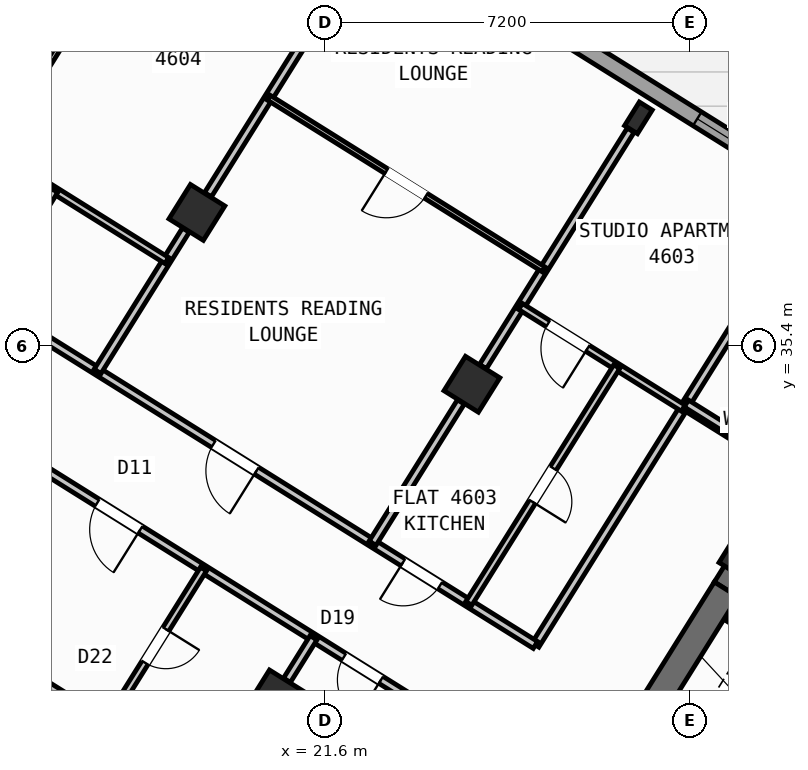
"""IFC4 building model, lengths in metres.
Left out: names, types, materials, properties, quantities, classifications, styles, units other than length and angle.
Written with IfcOpenShell. Run it as: python <this file> out.ifc"""

import sys

from ifc_helpers import new_model, si_unit, direction, frame, frame_2d, origin, origin_2d, place, context, subcontext, project, spatial, rectangle, hollow_rectangle, i_section, extrude, source, transform, mapped, element, fill, save


model = new_model("IFC4")
c1 = context("Model", 3, precision=1e-05, world=origin(), true_north=direction((0.0, 1.0)))
c2 = subcontext(c1, "Body", "Model", "MODEL_VIEW")
j1 = project(units=[si_unit("LENGTHUNIT", "METRE"), si_unit("PLANEANGLEUNIT", "RADIAN")], contexts=[c1])
p1 = place(None, origin())
s1 = spatial("IfcSite", under=j1, at=p1, CompositionType="ELEMENT")
p2 = place(p1, origin())
s2 = spatial("IfcBuilding", under=s1, at=p2, CompositionType="ELEMENT")
p3 = place(p2, frame((0.0, 0.0, 184.2)))
s3 = spatial("IfcBuildingStorey", under=s2, at=p3, CompositionType="ELEMENT", Elevation=184.2)
p4 = place(p3, frame((40.573, 24.01, 0.0), z_axis=(0.0, 0.0, 1.0), x_axis=(-0.848047359947, 0.529920442413, 0.0)))
e1 = element("IfcWall", 1, at=p4, inside=s3, PredefinedType="SHEAR", context=c2, shape_type="SweptSolid", body=[
    extrude(rectangle(XDim=13.14, YDim=0.55, at=frame_2d((6.57, 0.0))), origin(), (0.0, 0.0, 1.0), 3.35),
])
p5 = place(p3, frame((29.517, 30.594, 0.0), z_axis=(0.0, 0.0, 1.0), x_axis=(-0.529906864564, -0.848055844204, 0.0)))
e2 = element("IfcWall", 2, at=p5, inside=s3, PredefinedType="SHEAR", context=c2, shape_type="SweptSolid", body=[
    extrude(rectangle(XDim=3.575, YDim=0.55, at=frame_2d((1.788, 0.0))), origin(), (0.0, 0.0, 1.0), 3.35),
])
m1 = source(origin(), c2, "Body", "SweptSolid", [
    extrude(hollow_rectangle(XDim=0.8, YDim=0.8, WallThickness=0.032, at=origin_2d()), origin(), (0.0, 0.0, 1.0), 3.6),
])
p6 = place(p3, frame((29.928, 31.251, 0.0), z_axis=(0.0, 0.0, 1.0), x_axis=(-0.848048096156, 0.529919264233, 0.0)))
e3 = element("IfcColumn", 3, at=p6, inside=s3, PredefinedType="COLUMN", context=c2, shape_type="MappedRepresentation", body=[
    mapped(m1, transform((0.0, 0.0, 0.0), scale=1.0)),
])
m2 = source(origin(), c2, "Body", "SweptSolid", [
    extrude(i_section(OverallWidth=0.3, OverallDepth=0.55, WebThickness=0.015, FlangeThickness=0.029, at=origin_2d()), origin(), (0.0, 0.0, 1.0), 3.6),
])
p7 = place(p3, frame((27.786, 39.901, 0.0), z_axis=(0.0, 0.0, 1.0), x_axis=(-0.848048096156, 0.529919264233, 0.0)))
e4 = element("IfcColumn", 4, at=p7, inside=s3, PredefinedType="COLUMN", context=c2, shape_type="MappedRepresentation", body=[
    mapped(m2, transform((0.0, 0.0, 0.0), scale=1.0)),
])
for number, where, z_axis, x_axis in (
    (5, (24.5, 34.643, 0.0), (0.0, 0.0, 1.0), (-0.848, 0.53, 0.0)),
    (6, (20.632, 28.452, 0.0), (0.0, 0.0, 1.0), (-0.848, 0.53, 0.0)),
    (7, (19.073, 38.034, 0.0), (0.0, 0.0, 1.0), (-0.848, 0.53, 0.0)),
):
    element("IfcColumn", number, at=place(p3, frame(where, z_axis=z_axis, x_axis=x_axis)), inside=s3, PredefinedType="COLUMN", context=c2, shape_type="MappedRepresentation", body=[
        mapped(m1, transform((0.0, 0.0, 0.0), scale=1.0)),
    ])
p8 = place(p3, frame((5.7, 28.71, 0.0), z_axis=(0.0, 0.0, 1.0), x_axis=(0.529923711467, 0.8480453172, 0.0)))
e8 = element("IfcWall", 8, at=p8, inside=s3, PredefinedType="STANDARD", context=c2, shape_type="SweptSolid", body=[
    extrude(rectangle(XDim=21.587, YDim=0.32, at=frame_2d((10.794, 0.0))), origin(), (0.0, 0.0, 1.0), 2.825),
])
p9 = place(p8, frame((1.44, 0.0, 0.95)))
e9 = element("IfcOpeningElement", 9, at=p9, cuts=e8, PredefinedType="OPENING", context=c2, shape_type="SweptSolid", body=[
    extrude(rectangle(XDim=1.2, YDim=1.4, at=frame_2d((0.6, 0.7))), frame((0.0, 0.17, 0.0), z_axis=(0.0, -1.0, 0.0), x_axis=(1.0, 0.0, 0.0)), (0.0, 0.0, 1.0), 0.34),
])
p10 = place(p8, frame((4.545, 0.0, 0.85)))
e10 = element("IfcOpeningElement", 10, at=p10, cuts=e8, PredefinedType="OPENING", context=c2, shape_type="SweptSolid", body=[
    extrude(rectangle(XDim=1.8, YDim=1.5, at=frame_2d((0.9, 0.75))), frame((0.0, 0.17, 0.0), z_axis=(0.0, -1.0, 0.0), x_axis=(1.0, 0.0, 0.0)), (0.0, 0.0, 1.0), 0.34),
])
p11 = place(p8, frame((12.139, 0.0, 1.0)))
e11 = element("IfcOpeningElement", 11, at=p11, cuts=e8, PredefinedType="OPENING", context=c2, shape_type="SweptSolid", body=[
    extrude(rectangle(XDim=0.9, YDim=1.25, at=frame_2d((0.45, 0.625))), frame((0.0, 0.17, 0.0), z_axis=(0.0, -1.0, 0.0), x_axis=(1.0, 0.0, 0.0)), (0.0, 0.0, 1.0), 0.34),
])
p12 = place(p8, frame((16.35, 0.0, 0.95)))
e12 = element("IfcOpeningElement", 12, at=p12, cuts=e8, PredefinedType="OPENING", context=c2, shape_type="SweptSolid", body=[
    extrude(rectangle(XDim=1.2, YDim=1.4, at=frame_2d((0.6, 0.7))), frame((0.0, 0.17, 0.0), z_axis=(0.0, -1.0, 0.0), x_axis=(1.0, 0.0, 0.0)), (0.0, 0.0, 1.0), 0.34),
])
p13 = place(p8, frame((18.762, 0.0, 0.95)))
e13 = element("IfcOpeningElement", 13, at=p13, cuts=e8, PredefinedType="OPENING", context=c2, shape_type="SweptSolid", body=[
    extrude(rectangle(XDim=1.2, YDim=1.4, at=frame_2d((0.6, 0.7))), frame((0.0, 0.17, 0.0), z_axis=(0.0, -1.0, 0.0), x_axis=(1.0, 0.0, 0.0)), (0.0, 0.0, 1.0), 0.34),
])
p14 = place(p3, frame((17.424, 47.083, 0.0), z_axis=(0.0, 0.0, 1.0), x_axis=(0.848049927979, -0.529916332693, 0.0)))
e14 = element("IfcWall", 14, at=p14, inside=s3, PredefinedType="STANDARD", context=c2, shape_type="SweptSolid", body=[
    extrude(rectangle(XDim=29.223, YDim=0.32, at=frame_2d((14.612, 0.0))), origin(), (0.0, 0.0, 1.0), 3.35),
])
p15 = place(p14, frame((3.764, 0.0, 0.0)))
e15 = element("IfcOpeningElement", 15, at=p15, cuts=e14, PredefinedType="OPENING", context=c2, shape_type="SweptSolid", body=[
    extrude(rectangle(XDim=1.05, YDim=2.15, at=frame_2d((0.525, 1.075))), frame((0.0, 0.17, 0.0), z_axis=(0.0, -1.0, 0.0), x_axis=(1.0, 0.0, 0.0)), (0.0, 0.0, 1.0), 0.34),
])
p16 = place(p14, frame((8.344, 0.0, 0.8)))
e16 = element("IfcOpeningElement", 16, at=p16, cuts=e14, PredefinedType="OPENING", context=c2, shape_type="SweptSolid", body=[
    extrude(rectangle(XDim=2.1, YDim=1.55, at=frame_2d((1.05, 0.775))), frame((0.0, 0.17, 0.0), z_axis=(0.0, -1.0, 0.0), x_axis=(1.0, 0.0, 0.0)), (0.0, 0.0, 1.0), 0.34),
])
p17 = place(p14, frame((13.589, 0.0, 0.85)))
e17 = element("IfcOpeningElement", 17, at=p17, cuts=e14, PredefinedType="OPENING", context=c2, shape_type="SweptSolid", body=[
    extrude(rectangle(XDim=1.8, YDim=1.5, at=frame_2d((0.9, 0.75))), frame((0.0, 0.17, 0.0), z_axis=(0.0, -1.0, 0.0), x_axis=(1.0, 0.0, 0.0)), (0.0, 0.0, 1.0), 0.34),
])
p18 = place(p14, frame((17.104, 0.0, 0.95)))
e18 = element("IfcOpeningElement", 18, at=p18, cuts=e14, PredefinedType="OPENING", context=c2, shape_type="SweptSolid", body=[
    extrude(rectangle(XDim=1.2, YDim=1.4, at=frame_2d((0.6, 0.7))), frame((0.0, 0.17, 0.0), z_axis=(0.0, -1.0, 0.0), x_axis=(1.0, 0.0, 0.0)), (0.0, 0.0, 1.0), 0.34),
])
p19 = place(p14, frame((21.214, 0.0, 0.95)))
e19 = element("IfcOpeningElement", 19, at=p19, cuts=e14, PredefinedType="OPENING", context=c2, shape_type="SweptSolid", body=[
    extrude(rectangle(XDim=1.2, YDim=1.4, at=frame_2d((0.6, 0.7))), frame((0.0, 0.17, 0.0), z_axis=(0.0, -1.0, 0.0), x_axis=(1.0, 0.0, 0.0)), (0.0, 0.0, 1.0), 0.34),
])
p20 = place(p14, frame((25.853, 0.0, 0.95)))
e20 = element("IfcOpeningElement", 20, at=p20, cuts=e14, PredefinedType="OPENING", context=c2, shape_type="SweptSolid", body=[
    extrude(rectangle(XDim=1.2, YDim=1.4, at=frame_2d((0.6, 0.7))), frame((0.0, 0.17, 0.0), z_axis=(0.0, -1.0, 0.0), x_axis=(1.0, 0.0, 0.0)), (0.0, 0.0, 1.0), 0.34),
])
p21 = place(p3, frame((33.363, 27.69, 0.0), z_axis=(0.0, 0.0, 1.0), x_axis=(-0.848047090064, 0.529920874315, 0.0)))
e21 = element("IfcWall", 21, at=p21, inside=s3, PredefinedType="STANDARD", context=c2, shape_type="SweptSolid", body=[
    extrude(rectangle(XDim=4.498, YDim=0.2, at=frame_2d((2.249, 0.0))), origin(), (0.0, 0.0, 1.0), 3.34),
])
p22 = place(p3, frame((30.914, 32.829, 0.0), z_axis=(0.0, 0.0, 1.0), x_axis=(-0.848008813643, 0.529982124211, 0.0)))
e22 = element("IfcWall", 22, at=p22, inside=s3, PredefinedType="PARTITIONING", context=c2, shape_type="SweptSolid", body=[
    extrude(rectangle(XDim=2.61, YDim=0.16, at=frame_2d((1.305, 0.0))), origin(), (0.0, 0.0, 1.0), 3.34),
])
p23 = place(p3, frame((31.239, 38.274, 0.0), z_axis=(0.0, 0.0, 1.0), x_axis=(-0.529914125013, -0.848051307476, 0.0)))
e23 = element("IfcWall", 23, at=p23, inside=s3, PredefinedType="PARTITIONING", context=c2, shape_type="SweptSolid", body=[
    extrude(rectangle(XDim=10.35, YDim=0.16, at=frame_2d((5.175, 0.0))), origin(), (0.0, 0.0, 1.0), 3.34),
])
p24 = place(p3, frame((25.754, 29.497, 0.0), z_axis=(0.0, 0.0, 1.0), x_axis=(-0.848045850158, 0.529922858565, 0.0)))
e24 = element("IfcWall", 24, at=p24, inside=s3, PredefinedType="PARTITIONING", context=c2, shape_type="SweptSolid", body=[
    extrude(rectangle(XDim=16.73, YDim=0.16, at=frame_2d((8.365, 0.0))), origin(), (0.0, 0.0, 1.0), 3.34),
])
p25 = place(p24, frame((2.22, 0.0, 0.0)))
e25 = element("IfcOpeningElement", 25, at=p25, cuts=e24, PredefinedType="OPENING", context=c2, shape_type="SweptSolid", body=[
    extrude(rectangle(XDim=0.86, YDim=2.05, at=frame_2d((0.43, 1.025))), frame((0.0, 0.09, 0.0), z_axis=(0.0, -1.0, 0.0), x_axis=(1.0, 0.0, 0.0)), (0.0, 0.0, 1.0), 0.18),
])
p26 = place(p24, frame((6.49, 0.0, 0.0)))
e26 = element("IfcOpeningElement", 26, at=p26, cuts=e24, PredefinedType="OPENING", context=c2, shape_type="SweptSolid", body=[
    extrude(rectangle(XDim=1.0, YDim=2.1, at=frame_2d((0.5, 1.05))), frame((0.0, 0.09, 0.0), z_axis=(0.0, -1.0, 0.0), x_axis=(1.0, 0.0, 0.0)), (0.0, 0.0, 1.0), 0.18),
])
p27 = place(p24, frame((14.304, 0.0, 0.0)))
e27 = element("IfcOpeningElement", 27, at=p27, cuts=e24, PredefinedType="OPENING", context=c2, shape_type="SweptSolid", body=[
    extrude(rectangle(XDim=1.0, YDim=2.1, at=frame_2d((0.5, 1.05))), frame((0.0, 0.09, 0.0), z_axis=(0.0, -1.0, 0.0), x_axis=(1.0, 0.0, 0.0)), (0.0, 0.0, 1.0), 0.18),
])
p28 = place(p3, frame((24.588, 27.631, 0.0), z_axis=(0.0, 0.0, 1.0), x_axis=(-0.848041752158, 0.529929416617, 0.0)))
e28 = element("IfcWall", 28, at=p28, inside=s3, PredefinedType="PARTITIONING", context=c2, shape_type="SweptSolid", body=[
    extrude(rectangle(XDim=16.73, YDim=0.16, at=frame_2d((8.365, 0.0))), origin(), (0.0, 0.0, 1.0), 3.34),
])
p29 = place(p28, frame((2.22, 0.0, 0.0)))
e29 = element("IfcOpeningElement", 29, at=p29, cuts=e28, PredefinedType="OPENING", context=c2, shape_type="SweptSolid", body=[
    extrude(rectangle(XDim=0.86, YDim=2.05, at=frame_2d((0.43, 1.025))), frame((0.0, 0.09, 0.0), z_axis=(0.0, -1.0, 0.0), x_axis=(1.0, 0.0, 0.0)), (0.0, 0.0, 1.0), 0.18),
])
p30 = place(p28, frame((7.82, 0.0, 0.0)))
e30 = element("IfcOpeningElement", 30, at=p30, cuts=e28, PredefinedType="OPENING", context=c2, shape_type="SweptSolid", body=[
    extrude(rectangle(XDim=1.0, YDim=2.1, at=frame_2d((0.5, 1.05))), frame((0.0, 0.09, 0.0), z_axis=(0.0, -1.0, 0.0), x_axis=(1.0, 0.0, 0.0)), (0.0, 0.0, 1.0), 0.18),
])
p31 = place(p28, frame((12.95, 0.0, 0.0)))
e31 = element("IfcOpeningElement", 31, at=p31, cuts=e28, PredefinedType="OPENING", context=c2, shape_type="SweptSolid", body=[
    extrude(rectangle(XDim=1.0, YDim=2.1, at=frame_2d((0.5, 1.05))), frame((0.0, 0.09, 0.0), z_axis=(0.0, -1.0, 0.0), x_axis=(1.0, 0.0, 0.0)), (0.0, 0.0, 1.0), 0.18),
])
p32 = place(p3, frame((21.374, 29.639, 0.0), z_axis=(0.0, 0.0, 1.0), x_axis=(-0.529998940003, -0.847998304005, 0.0)))
e32 = element("IfcWall", 32, at=p32, inside=s3, PredefinedType="PARTITIONING", context=c2, shape_type="SweptSolid", body=[
    extrude(rectangle(XDim=0.988, YDim=0.16, at=frame_2d((0.494, 0.0))), origin(), (0.0, 0.0, 1.0), 2.825),
])
p33 = place(p3, frame((19.477, 26.603, 0.0), z_axis=(0.0, 0.0, 1.0), x_axis=(-0.848039019877, 0.529933789039, 0.0)))
e33 = element("IfcWall", 33, at=p33, inside=s3, PredefinedType="PLUMBINGWALL", context=c2, shape_type="SweptSolid", body=[
    extrude(rectangle(XDim=6.4, YDim=0.14, at=frame_2d((3.2, 0.0))), origin(), (0.0, 0.0, 1.0), 3.34),
])
p34 = place(p33, frame((2.824, 0.0, 0.0)))
e34 = element("IfcOpeningElement", 34, at=p34, cuts=e33, PredefinedType="OPENING", context=c2, shape_type="SweptSolid", body=[
    extrude(rectangle(XDim=0.78, YDim=2.05, at=frame_2d((0.39, 1.025))), frame((0.0, 0.08, 0.0), z_axis=(0.0, -1.0, 0.0), x_axis=(1.0, 0.0, 0.0)), (0.0, 0.0, 1.0), 0.16),
])
p35 = place(p3, frame((19.203, 30.996, 0.0), z_axis=(0.0, 0.0, 1.0), x_axis=(-0.529906983049, -0.848055770169, 0.0)))
e35 = element("IfcWall", 35, at=p35, inside=s3, PredefinedType="PLUMBINGWALL", context=c2, shape_type="SweptSolid", body=[
    extrude(rectangle(XDim=3.58, YDim=0.14, at=frame_2d((1.79, 0.0))), origin(), (0.0, 0.0, 1.0), 3.34),
])
p36 = place(p35, frame((1.4, 0.0, 0.0)))
e36 = element("IfcOpeningElement", 36, at=p36, cuts=e35, PredefinedType="OPENING", context=c2, shape_type="SweptSolid", body=[
    extrude(rectangle(XDim=0.78, YDim=2.05, at=frame_2d((0.39, 1.025))), frame((0.0, 0.08, 0.0), z_axis=(0.0, -1.0, 0.0), x_axis=(1.0, 0.0, 0.0)), (0.0, 0.0, 1.0), 0.16),
])
p37 = place(p3, frame((27.634, 39.657, 0.0), z_axis=(0.0, 0.0, 1.0), x_axis=(-0.529899205623, -0.848060629837, 0.0)))
e37 = element("IfcWall", 37, at=p37, inside=s3, PredefinedType="PARTITIONING", context=c2, shape_type="SweptSolid", body=[
    extrude(rectangle(XDim=5.501, YDim=0.16, at=frame_2d((2.75, 0.0))), origin(), (0.0, 0.0, 1.0), 2.825),
])
p38 = place(p3, frame((24.282, 34.293, 0.0), z_axis=(0.0, 0.0, 1.0), x_axis=(-0.529938869374, -0.84803584519, 0.0)))
e38 = element("IfcWall", 38, at=p38, inside=s3, PredefinedType="PARTITIONING", context=c2, shape_type="SweptSolid", body=[
    extrude(rectangle(XDim=3.288, YDim=0.16, at=frame_2d((1.644, 0.0))), origin(), (0.0, 0.0, 1.0), 2.825),
])
p39 = place(p3, frame((28.674, 34.169, 0.0), z_axis=(0.0, 0.0, 1.0), x_axis=(-0.848059820872, 0.529900500304, 0.0)))
e39 = element("IfcWall", 39, at=p39, inside=s3, PredefinedType="PLUMBINGWALL", context=c2, shape_type="SweptSolid", body=[
    extrude(rectangle(XDim=3.79, YDim=0.14, at=frame_2d((1.895, 0.0))), origin(), (0.0, 0.0, 1.0), 3.34),
])
p40 = place(p39, frame((2.23, 0.0, 0.0)))
e40 = element("IfcOpeningElement", 40, at=p40, cuts=e39, PredefinedType="OPENING", context=c2, shape_type="SweptSolid", body=[
    extrude(rectangle(XDim=0.92, YDim=2.08, at=frame_2d((0.46, 1.04))), frame((0.0, 0.08, 0.0), z_axis=(0.0, -1.0, 0.0), x_axis=(1.0, 0.0, 0.0)), (0.0, 0.0, 1.0), 0.16),
])
p41 = place(p3, frame((27.359, 34.991, 0.0), z_axis=(0.0, 0.0, 1.0), x_axis=(-0.529907329021, -0.848055553988, 0.0)))
e41 = element("IfcWall", 41, at=p41, inside=s3, PredefinedType="PLUMBINGWALL", context=c2, shape_type="SweptSolid", body=[
    extrude(rectangle(XDim=5.51, YDim=0.14, at=frame_2d((2.755, 0.0))), origin(), (0.0, 0.0, 1.0), 2.995),
])
p42 = place(p41, frame((2.365, 0.0, 0.0)))
e42 = element("IfcOpeningElement", 42, at=p42, cuts=e41, PredefinedType="OPENING", context=c2, shape_type="SweptSolid", body=[
    extrude(rectangle(XDim=0.78, YDim=2.05, at=frame_2d((0.39, 1.025))), frame((0.0, 0.08, 0.0), z_axis=(0.0, -1.0, 0.0), x_axis=(1.0, 0.0, 0.0)), (0.0, 0.0, 1.0), 0.16),
])
p43 = place(p3, frame((22.206, 43.049, 0.0), z_axis=(0.0, 0.0, 1.0), x_axis=(-0.529919150083, -0.848048167486, 0.0)))
e43 = element("IfcWall", 43, at=p43, inside=s3, PredefinedType="PARTITIONING", context=c2, shape_type="SweptSolid", body=[
    extrude(rectangle(XDim=5.501, YDim=0.16, at=frame_2d((2.75, 0.0))), origin(), (0.0, 0.0, 1.0), 2.825),
])
p44 = place(p3, frame((18.854, 37.685, 0.0), z_axis=(0.0, 0.0, 1.0), x_axis=(-0.529885466561, -0.848069214349, 0.0)))
e44 = element("IfcWall", 44, at=p44, inside=s3, PredefinedType="PARTITIONING", context=c2, shape_type="SweptSolid", body=[
    extrude(rectangle(XDim=3.288, YDim=0.16, at=frame_2d((1.644, 0.0))), origin(), (0.0, 0.0, 1.0), 2.825),
])
p45 = place(p3, frame((25.916, 36.909, 0.0), z_axis=(0.0, 0.0, 1.0), x_axis=(-0.848056163074, 0.529906354247, 0.0)))
e45 = element("IfcWall", 45, at=p45, inside=s3, PredefinedType="PARTITIONING", context=c2, shape_type="SweptSolid", body=[
    extrude(rectangle(XDim=6.4, YDim=0.11, at=frame_2d((3.2, 0.0))), origin(), (0.0, 0.0, 1.0), 3.34),
])
p46 = place(p45, frame((2.74, 0.0, 0.0)))
e46 = element("IfcOpeningElement", 46, at=p46, cuts=e45, PredefinedType="OPENING", context=c2, shape_type="SweptSolid", body=[
    extrude(rectangle(XDim=0.92, YDim=2.08, at=frame_2d((0.46, 1.04))), frame((0.0, 0.065, 0.0), z_axis=(0.0, -1.0, 0.0), x_axis=(1.0, 0.0, 0.0)), (0.0, 0.0, 1.0), 0.13),
])
p47 = place(p3, frame((18.479, 37.084, 0.0), z_axis=(0.0, 0.0, 1.0), x_axis=(-0.848048787466, 0.529918157905, 0.0)))
e47 = element("IfcWall", 47, at=p47, inside=s3, PredefinedType="PLUMBINGWALL", context=c2, shape_type="SweptSolid", body=[
    extrude(rectangle(XDim=6.52, YDim=0.14, at=frame_2d((3.26, 0.0))), origin(), (0.0, 0.0, 1.0), 3.34),
])
p48 = place(p47, frame((2.885, 0.0, 0.0)))
e48 = element("IfcOpeningElement", 48, at=p48, cuts=e47, PredefinedType="OPENING", context=c2, shape_type="SweptSolid", body=[
    extrude(rectangle(XDim=0.78, YDim=2.05, at=frame_2d((0.39, 1.025))), frame((0.0, 0.08, 0.0), z_axis=(0.0, -1.0, 0.0), x_axis=(1.0, 0.0, 0.0)), (0.0, 0.0, 1.0), 0.16),
])
p49 = place(p3, frame((16.268, 38.467, 0.0), z_axis=(0.0, 0.0, 1.0), x_axis=(-0.529913878929, -0.848051461244, 0.0)))
e49 = element("IfcWall", 49, at=p49, inside=s3, PredefinedType="PLUMBINGWALL", context=c2, shape_type="SweptSolid", body=[
    extrude(rectangle(XDim=2.58, YDim=0.14, at=frame_2d((1.29, 0.0))), origin(), (0.0, 0.0, 1.0), 3.34),
])
p50 = place(p49, frame((0.9, 0.0, 0.0)))
e50 = element("IfcOpeningElement", 50, at=p50, cuts=e49, PredefinedType="OPENING", context=c2, shape_type="SweptSolid", body=[
    extrude(rectangle(XDim=0.78, YDim=2.05, at=frame_2d((0.39, 1.025))), frame((0.0, 0.08, 0.0), z_axis=(0.0, -1.0, 0.0), x_axis=(1.0, 0.0, 0.0)), (0.0, 0.0, 1.0), 0.16),
])
p51 = place(p3, frame((19.312, 46.045, 0.0), z_axis=(0.0, 0.0, 1.0), x_axis=(-0.529933431478, -0.848039243315, 0.0)))
e51 = element("IfcWall", 51, at=p51, inside=s3, PredefinedType="PARTITIONING", context=c2, shape_type="SweptSolid", body=[
    extrude(rectangle(XDim=8.04, YDim=0.11, at=frame_2d((4.02, 0.0))), origin(), (0.0, 0.0, 1.0), 2.995),
])
p52 = place(p51, frame((0.47, 0.0, 0.0)))
e52 = element("IfcOpeningElement", 52, at=p52, cuts=e51, PredefinedType="OPENING", context=c2, shape_type="SweptSolid", body=[
    extrude(rectangle(XDim=0.92, YDim=2.08, at=frame_2d((0.46, 1.04))), frame((0.0, 0.065, 0.0), z_axis=(0.0, -1.0, 0.0), x_axis=(1.0, 0.0, 0.0)), (0.0, 0.0, 1.0), 0.13),
])
p53 = place(p3, frame((41.936, 26.012, 0.0), z_axis=(0.0, 0.0, 1.0), x_axis=(-0.848051154596, 0.529914369676, 0.0)))
e53 = element("IfcWall", 53, at=p53, inside=s3, PredefinedType="PARTITIONING", context=c2, shape_type="SweptSolid", body=[
    extrude(rectangle(XDim=15.57, YDim=0.16, at=frame_2d((7.785, 0.0))), origin(), (0.0, 0.0, 1.0), 3.34),
])
p54 = place(p53, frame((10.83, 0.0, 0.0)))
e54 = element("IfcOpeningElement", 54, at=p54, cuts=e53, PredefinedType="OPENING", context=c2, shape_type="SweptSolid", body=[
    extrude(rectangle(XDim=1.0, YDim=2.1, at=frame_2d((0.5, 1.05))), frame((0.0, 0.09, 0.0), z_axis=(0.0, -1.0, 0.0), x_axis=(1.0, 0.0, 0.0)), (0.0, 0.0, 1.0), 0.18),
])
m3 = source(origin(), c2, "Body", "SweptSolid", [
    extrude(rectangle(XDim=1.8, YDim=1.5, at=frame_2d((0.9, 0.75))), frame((0.0, 0.03, 0.0), z_axis=(0.0, -1.0, 0.0), x_axis=(1.0, 0.0, 0.0)), (0.0, 0.0, 1.0), 0.06),
])
p55 = place(p17, origin())
e55 = element("IfcWindow", 55, at=p55, inside=s3, PartitioningType="SINGLE_PANEL", PredefinedType="WINDOW", context=c2, shape_type="MappedRepresentation", body=[
    mapped(m3, transform((0.0, 0.0, 0.0), scale=1.0)),
])
fill(e17, e55)
m4 = source(origin(), c2, "Body", "SweptSolid", [
    extrude(rectangle(XDim=0.86, YDim=2.05, at=frame_2d((0.43, 1.025))), frame((0.0, 0.025, 0.0), z_axis=(0.0, -1.0, 0.0), x_axis=(1.0, 0.0, 0.0)), (0.0, 0.0, 1.0), 0.05),
])
p56 = place(p29, origin())
e56 = element("IfcDoor", 56, at=p56, inside=s3, OperationType="SINGLE_SWING_LEFT", PredefinedType="DOOR", context=c2, shape_type="MappedRepresentation", body=[
    mapped(m4, transform((0.0, 0.0, 0.0), scale=1.0)),
])
fill(e29, e56)
m5 = source(origin(), c2, "Body", "SweptSolid", [
    extrude(rectangle(XDim=1.0, YDim=2.1, at=frame_2d((0.5, 1.05))), frame((0.0, 0.025, 0.0), z_axis=(0.0, -1.0, 0.0), x_axis=(1.0, 0.0, 0.0)), (0.0, 0.0, 1.0), 0.05),
])
p57 = place(p30, origin())
e57 = element("IfcDoor", 57, at=p57, inside=s3, OperationType="SINGLE_SWING_LEFT", PredefinedType="DOOR", context=c2, shape_type="MappedRepresentation", body=[
    mapped(m5, transform((0.0, 0.0, 0.0), scale=1.0)),
])
fill(e30, e57)
m6 = source(origin(), c2, "Body", "SweptSolid", [
    extrude(rectangle(XDim=0.78, YDim=2.05, at=frame_2d((0.39, 1.025))), frame((0.0, 0.025, 0.0), z_axis=(0.0, -1.0, 0.0), x_axis=(1.0, 0.0, 0.0)), (0.0, 0.0, 1.0), 0.05),
])
p58 = place(p36, origin())
e58 = element("IfcDoor", 58, at=p58, inside=s3, OperationType="SINGLE_SWING_LEFT", PredefinedType="DOOR", context=c2, shape_type="MappedRepresentation", body=[
    mapped(m6, transform((0.0, 0.0, 0.0), scale=1.0)),
])
fill(e36, e58)
p59 = place(p25, origin())
e59 = element("IfcDoor", 59, at=p59, inside=s3, OperationType="SINGLE_SWING_RIGHT", PredefinedType="DOOR", context=c2, shape_type="MappedRepresentation", body=[
    mapped(m4, transform((0.0, 0.0, 0.0), scale=1.0)),
])
fill(e25, e59)
m7 = source(origin(), c2, "Body", "SweptSolid", [
    extrude(rectangle(XDim=0.92, YDim=2.08, at=frame_2d((0.46, 1.04))), frame((0.0, 0.025, 0.0), z_axis=(0.0, -1.0, 0.0), x_axis=(1.0, 0.0, 0.0)), (0.0, 0.0, 1.0), 0.05),
])
p60 = place(p40, origin())
e60 = element("IfcDoor", 60, at=p60, inside=s3, OperationType="SINGLE_SWING_LEFT", PredefinedType="DOOR", context=c2, shape_type="MappedRepresentation", body=[
    mapped(m7, transform((0.0, 0.0, 0.0), scale=1.0)),
])
fill(e40, e60)
p61 = place(p42, origin())
e61 = element("IfcDoor", 61, at=p61, inside=s3, OperationType="SINGLE_SWING_RIGHT", PredefinedType="DOOR", context=c2, shape_type="MappedRepresentation", body=[
    mapped(m6, transform((0.0, 0.0, 0.0), scale=1.0)),
])
fill(e42, e61)
p62 = place(p26, origin())
e62 = element("IfcDoor", 62, at=p62, inside=s3, OperationType="SINGLE_SWING_LEFT", PredefinedType="DOOR", context=c2, shape_type="MappedRepresentation", body=[
    mapped(m5, transform((0.0, 0.0, 0.0), scale=1.0)),
])
fill(e26, e62)
p63 = place(p46, origin())
e63 = element("IfcDoor", 63, at=p63, inside=s3, OperationType="SINGLE_SWING_RIGHT", PredefinedType="DOOR", context=c2, shape_type="MappedRepresentation", body=[
    mapped(m7, transform((0.0, 0.0, 0.0), scale=1.0)),
])
fill(e46, e63)
save(model, sys.argv[1])
